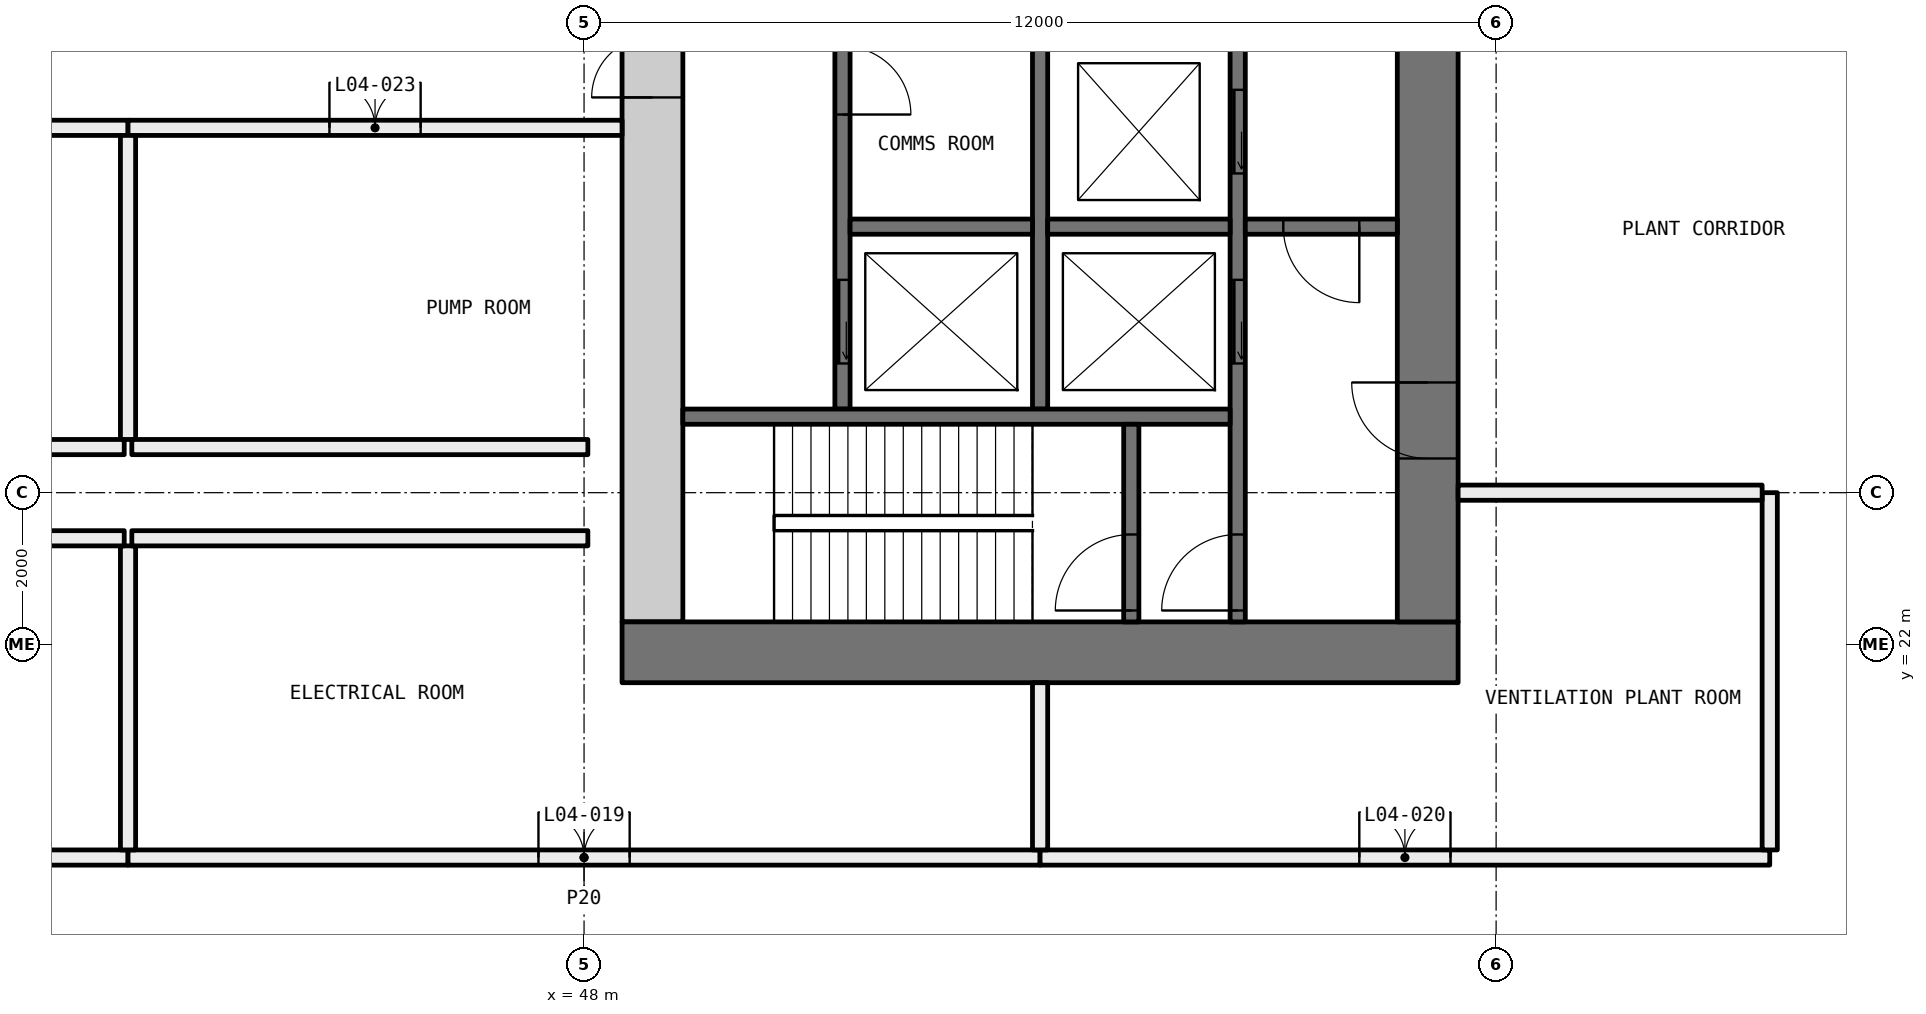
"""IFC4 building model, lengths in metres.
Left out: names, types, materials, properties, quantities, classifications, styles, units other than length and angle.
Written with IfcOpenShell. Run it as: python <this file> out.ifc"""

import sys

from ifc_helpers import new_model, si_unit, direction, frame, frame_2d, origin, place, context, subcontext, project, spatial, rectangle, extrude, element, fill, save


model = new_model("IFC4")
c1 = context("Model", 3, precision=1e-05, world=origin(), true_north=direction((0.0, 1.0)))
c2 = subcontext(c1, "Body", "Model", "MODEL_VIEW")
j1 = project(units=[si_unit("LENGTHUNIT", "METRE"), si_unit("PLANEANGLEUNIT", "RADIAN")], contexts=[c1])
p1 = place(None, origin())
s1 = spatial("IfcSite", under=j1, at=p1, CompositionType="ELEMENT")
p2 = place(p1, origin())
s2 = spatial("IfcBuilding", under=s1, at=p2, CompositionType="ELEMENT")
p3 = place(p2, frame((0.0, 0.0, 24.0)))
s3 = spatial("IfcBuildingStorey", under=s2, at=p3, CompositionType="ELEMENT", Elevation=24.0)
p4 = place(p3, frame((30.0, 19.2, 0.0), z_axis=(0.0, 0.0, 1.0), x_axis=(1.0, 0.0, 0.0)))
e1 = element("IfcWall", 1, at=p4, inside=s3, PredefinedType="PARTITIONING", context=c2, shape_type="SweptSolid", body=[
    extrude(rectangle(XDim=12.0, YDim=0.2, at=frame_2d((6.0, 0.0))), origin(), (0.0, 0.0, 1.0), 5.6),
])
p5 = place(p4, frame((5.4, 0.0, 0.0)))
e2 = element("IfcOpeningElement", 2, at=p5, cuts=e1, PredefinedType="OPENING", context=c2, shape_type="SweptSolid", body=[
    extrude(rectangle(XDim=1.2, YDim=2.1, at=frame_2d((0.6, 1.05))), frame((0.0, 0.11, 0.0), z_axis=(0.0, -1.0, 0.0), x_axis=(1.0, 0.0, 0.0)), (0.0, 0.0, 1.0), 0.22),
])
p6 = place(p3, frame((42.0, 19.2, 0.0), z_axis=(0.0, 0.0, 1.0), x_axis=(1.0, 0.0, 0.0)))
e3 = element("IfcWall", 3, at=p6, inside=s3, PredefinedType="PARTITIONING", context=c2, shape_type="SweptSolid", body=[
    extrude(rectangle(XDim=12.0, YDim=0.2, at=frame_2d((6.0, 0.0))), origin(), (0.0, 0.0, 1.0), 5.6),
])
p7 = place(p6, frame((5.4, 0.0, 0.0)))
e4 = element("IfcOpeningElement", 4, at=p7, cuts=e3, PredefinedType="OPENING", context=c2, shape_type="SweptSolid", body=[
    extrude(rectangle(XDim=1.2, YDim=2.1, at=frame_2d((0.6, 1.05))), frame((0.0, 0.11, 0.0), z_axis=(0.0, -1.0, 0.0), x_axis=(1.0, 0.0, 0.0)), (0.0, 0.0, 1.0), 0.22),
])
p8 = place(p3, frame((54.0, 19.2, 0.0), z_axis=(0.0, 0.0, 1.0), x_axis=(1.0, 0.0, 0.0)))
e5 = element("IfcWall", 5, at=p8, inside=s3, PredefinedType="PARTITIONING", context=c2, shape_type="SweptSolid", body=[
    extrude(rectangle(XDim=9.6, YDim=0.2, at=frame_2d((4.8, 0.0))), origin(), (0.0, 0.0, 1.0), 5.6),
])
p9 = place(p8, frame((4.2, 0.0, 0.0)))
e6 = element("IfcOpeningElement", 6, at=p9, cuts=e5, PredefinedType="OPENING", context=c2, shape_type="SweptSolid", body=[
    extrude(rectangle(XDim=1.2, YDim=2.1, at=frame_2d((0.6, 1.05))), frame((0.0, 0.11, 0.0), z_axis=(0.0, -1.0, 0.0), x_axis=(1.0, 0.0, 0.0)), (0.0, 0.0, 1.0), 0.22),
])
p10 = place(p3, frame((63.6, 19.3, 0.0), z_axis=(0.0, 0.0, 1.0), x_axis=(0.0, 1.0, 0.0)))
e7 = element("IfcWall", 7, at=p10, inside=s3, PredefinedType="PARTITIONING", context=c2, shape_type="SweptSolid", body=[
    extrude(rectangle(XDim=4.7, YDim=0.2, at=frame_2d((2.35, 0.0))), origin(), (0.0, 0.0, 1.0), 5.0),
])
p11 = place(p3, frame((63.5, 24.0, 0.0), z_axis=(0.0, 0.0, 1.0), x_axis=(-1.0, 0.0, 0.0)))
e8 = element("IfcWall", 8, at=p11, inside=s3, PredefinedType="PARTITIONING", context=c2, shape_type="SweptSolid", body=[
    extrude(rectangle(XDim=4.0, YDim=0.2, at=frame_2d((2.0, 0.0))), origin(), (0.0, 0.0, 1.0), 5.0),
])
p12 = place(p3, frame((30.0, 28.8, 0.0), z_axis=(0.0, 0.0, 1.0), x_axis=(1.0, 0.0, 0.0)))
e9 = element("IfcWall", 9, at=p12, inside=s3, PredefinedType="PARTITIONING", context=c2, shape_type="SweptSolid", body=[
    extrude(rectangle(XDim=12.0, YDim=0.2, at=frame_2d((6.0, 0.0))), origin(), (0.0, 0.0, 1.0), 5.6),
])
p13 = place(p12, frame((5.4, 0.0, 0.0)))
e10 = element("IfcOpeningElement", 10, at=p13, cuts=e9, PredefinedType="OPENING", context=c2, shape_type="SweptSolid", body=[
    extrude(rectangle(XDim=1.2, YDim=2.1, at=frame_2d((0.6, 1.05))), frame((0.0, 0.11, 0.0), z_axis=(0.0, -1.0, 0.0), x_axis=(1.0, 0.0, 0.0)), (0.0, 0.0, 1.0), 0.22),
])
p14 = place(p3, frame((42.0, 28.8, 0.0), z_axis=(0.0, 0.0, 1.0), x_axis=(1.0, 0.0, 0.0)))
e11 = element("IfcWall", 11, at=p14, inside=s3, PredefinedType="PARTITIONING", context=c2, shape_type="SweptSolid", body=[
    extrude(rectangle(XDim=6.5, YDim=0.2, at=frame_2d((3.25, 0.0))), origin(), (0.0, 0.0, 1.0), 5.6),
])
p15 = place(p14, frame((2.65, 0.0, 0.0)))
e12 = element("IfcOpeningElement", 12, at=p15, cuts=e11, PredefinedType="OPENING", context=c2, shape_type="SweptSolid", body=[
    extrude(rectangle(XDim=1.2, YDim=2.1, at=frame_2d((0.6, 1.05))), frame((0.0, 0.11, 0.0), z_axis=(0.0, -1.0, 0.0), x_axis=(1.0, 0.0, 0.0)), (0.0, 0.0, 1.0), 0.22),
])
p16 = place(p3, frame((42.0, 19.3, 0.0), z_axis=(0.0, 0.0, 1.0), x_axis=(0.0, 1.0, 0.0)))
e13 = element("IfcWall", 13, at=p16, inside=s3, PredefinedType="PARTITIONING", context=c2, shape_type="SweptSolid", body=[
    extrude(rectangle(XDim=4.0, YDim=0.2, at=frame_2d((2.0, 0.0))), origin(), (0.0, 0.0, 1.0), 5.6),
])
p17 = place(p3, frame((54.0, 19.3, 0.0), z_axis=(0.0, 0.0, 1.0), x_axis=(0.0, 1.0, 0.0)))
e14 = element("IfcWall", 14, at=p17, inside=s3, PredefinedType="PARTITIONING", context=c2, shape_type="SweptSolid", body=[
    extrude(rectangle(XDim=2.2, YDim=0.2, at=frame_2d((1.1, 0.0))), origin(), (0.0, 0.0, 1.0), 5.6),
])
p18 = place(p3, frame((42.0, 24.7, 0.0), z_axis=(0.0, 0.0, 1.0), x_axis=(0.0, 1.0, 0.0)))
e15 = element("IfcWall", 15, at=p18, inside=s3, PredefinedType="PARTITIONING", context=c2, shape_type="SweptSolid", body=[
    extrude(rectangle(XDim=4.0, YDim=0.2, at=frame_2d((2.0, 0.0))), origin(), (0.0, 0.0, 1.0), 5.6),
])
p19 = place(p3, frame((41.95, 23.4, 0.0), z_axis=(0.0, 0.0, 1.0), x_axis=(-1.0, 0.0, 0.0)))
e16 = element("IfcWall", 16, at=p19, inside=s3, PredefinedType="PARTITIONING", context=c2, shape_type="SweptSolid", body=[
    extrude(rectangle(XDim=11.9, YDim=0.2, at=frame_2d((5.95, 0.0))), origin(), (0.0, 0.0, 1.0), 5.6),
])
p20 = place(p3, frame((48.05, 23.4, 0.0), z_axis=(0.0, 0.0, 1.0), x_axis=(-1.0, 0.0, 0.0)))
e17 = element("IfcWall", 17, at=p20, inside=s3, PredefinedType="PARTITIONING", context=c2, shape_type="SweptSolid", body=[
    extrude(rectangle(XDim=6.0, YDim=0.2, at=frame_2d((3.0, 0.0))), origin(), (0.0, 0.0, 1.0), 5.6),
])
p21 = place(p3, frame((30.05, 24.6, 0.0), z_axis=(0.0, 0.0, 1.0), x_axis=(1.0, 0.0, 0.0)))
e18 = element("IfcWall", 18, at=p21, inside=s3, PredefinedType="PARTITIONING", context=c2, shape_type="SweptSolid", body=[
    extrude(rectangle(XDim=11.9, YDim=0.2, at=frame_2d((5.95, 0.0))), origin(), (0.0, 0.0, 1.0), 5.6),
])
p22 = place(p3, frame((42.05, 24.6, 0.0), z_axis=(0.0, 0.0, 1.0), x_axis=(1.0, 0.0, 0.0)))
e19 = element("IfcWall", 19, at=p22, inside=s3, PredefinedType="PARTITIONING", context=c2, shape_type="SweptSolid", body=[
    extrude(rectangle(XDim=6.0, YDim=0.2, at=frame_2d((3.0, 0.0))), origin(), (0.0, 0.0, 1.0), 5.6),
])
p23 = place(p3, frame((59.5, 21.9, 0.0), z_axis=(0.0, 0.0, 1.0), x_axis=(-1.0, 0.0, 0.0)))
e20 = element("IfcWall", 20, at=p23, inside=s3, PredefinedType="SHEAR", context=c2, shape_type="SweptSolid", body=[
    extrude(rectangle(XDim=11.0, YDim=0.8, at=frame_2d((5.5, 0.0))), origin(), (0.0, 0.0, 1.0), 5.6),
])
p24 = place(p3, frame((59.1, 22.3, 0.0), z_axis=(0.0, 0.0, 1.0), x_axis=(0.0, 1.0, 0.0)))
e21 = element("IfcWall", 21, at=p24, inside=s3, PredefinedType="SHEAR", context=c2, shape_type="SweptSolid", body=[
    extrude(rectangle(XDim=15.4, YDim=0.8, at=frame_2d((7.7, 0.0))), origin(), (0.0, 0.0, 1.0), 5.6),
])
p25 = place(p24, frame((8.15, 0.0, 0.0)))
e22 = element("IfcOpeningElement", 22, at=p25, cuts=e21, PredefinedType="OPENING", context=c2, shape_type="SweptSolid", body=[
    extrude(rectangle(XDim=1.6, YDim=2.1, at=frame_2d((0.8, 1.05))), frame((0.0, 0.41, 0.0), z_axis=(0.0, -1.0, 0.0), x_axis=(1.0, 0.0, 0.0)), (0.0, 0.0, 1.0), 0.82),
])
p26 = place(p24, frame((2.15, 0.0, 0.0)))
e23 = element("IfcOpeningElement", 23, at=p26, cuts=e21, PredefinedType="OPENING", context=c2, shape_type="SweptSolid", body=[
    extrude(rectangle(XDim=1.0, YDim=2.1, at=frame_2d((0.5, 1.05))), frame((0.0, 0.41, 0.0), z_axis=(0.0, -1.0, 0.0), x_axis=(1.0, 0.0, 0.0)), (0.0, 0.0, 1.0), 0.82),
])
p27 = place(p3, frame((48.9, 22.3, 0.0), z_axis=(0.0, 0.0, 1.0), x_axis=(0.0, 1.0, 0.0)))
e24 = element("IfcWall", 24, at=p27, inside=s3, PredefinedType="SHEAR", context=c2, shape_type="SweptSolid", body=[
    extrude(rectangle(XDim=15.4, YDim=0.8, at=frame_2d((7.7, 0.0))), origin(), (0.0, 0.0, 1.0), 5.6),
])
p28 = place(p27, frame((6.9, 0.0, 0.0)))
e25 = element("IfcOpeningElement", 25, at=p28, cuts=e24, PredefinedType="OPENING", context=c2, shape_type="SweptSolid", body=[
    extrude(rectangle(XDim=1.6, YDim=2.1, at=frame_2d((0.8, 1.05))), frame((0.0, 0.41, 0.0), z_axis=(0.0, -1.0, 0.0), x_axis=(1.0, 0.0, 0.0)), (0.0, 0.0, 1.0), 0.82),
])
p29 = place(p3, frame((56.6, 22.3, 0.0), z_axis=(0.0, 0.0, 1.0), x_axis=(0.0, 1.0, 0.0)))
e26 = element("IfcWall", 26, at=p29, inside=s3, PredefinedType="SOLIDWALL", context=c2, shape_type="SweptSolid", body=[
    extrude(rectangle(XDim=12.6, YDim=0.2, at=frame_2d((6.3, 0.0))), origin(), (0.0, 0.0, 1.0), 5.6),
])
p30 = place(p29, frame((3.4, 0.0, 0.0)))
e27 = element("IfcOpeningElement", 27, at=p30, cuts=e26, PredefinedType="OPENING", context=c2, shape_type="SweptSolid", body=[
    extrude(rectangle(XDim=1.1, YDim=2.1, at=frame_2d((0.55, 1.05))), frame((0.0, 0.11, 0.0), z_axis=(0.0, -1.0, 0.0), x_axis=(1.0, 0.0, 0.0)), (0.0, 0.0, 1.0), 0.22),
])
p31 = place(p29, frame((5.9, 0.0, 0.0)))
e28 = element("IfcOpeningElement", 28, at=p31, cuts=e26, PredefinedType="OPENING", context=c2, shape_type="SweptSolid", body=[
    extrude(rectangle(XDim=1.1, YDim=2.1, at=frame_2d((0.55, 1.05))), frame((0.0, 0.11, 0.0), z_axis=(0.0, -1.0, 0.0), x_axis=(1.0, 0.0, 0.0)), (0.0, 0.0, 1.0), 0.22),
])
p32 = place(p29, frame((8.4, 0.0, 0.0)))
e29 = element("IfcOpeningElement", 29, at=p32, cuts=e26, PredefinedType="OPENING", context=c2, shape_type="SweptSolid", body=[
    extrude(rectangle(XDim=1.1, YDim=2.1, at=frame_2d((0.55, 1.05))), frame((0.0, 0.11, 0.0), z_axis=(0.0, -1.0, 0.0), x_axis=(1.0, 0.0, 0.0)), (0.0, 0.0, 1.0), 0.22),
])
p33 = place(p29, frame((10.9, 0.0, 0.0)))
e30 = element("IfcOpeningElement", 30, at=p33, cuts=e26, PredefinedType="OPENING", context=c2, shape_type="SweptSolid", body=[
    extrude(rectangle(XDim=1.1, YDim=2.1, at=frame_2d((0.55, 1.05))), frame((0.0, 0.11, 0.0), z_axis=(0.0, -1.0, 0.0), x_axis=(1.0, 0.0, 0.0)), (0.0, 0.0, 1.0), 0.22),
])
p34 = place(p29, frame((0.15, 0.0, 0.0)))
e31 = element("IfcOpeningElement", 31, at=p34, cuts=e26, PredefinedType="OPENING", context=c2, shape_type="SweptSolid", body=[
    extrude(rectangle(XDim=1.0, YDim=2.1, at=frame_2d((0.5, 1.05))), frame((0.0, 0.11, 0.0), z_axis=(0.0, -1.0, 0.0), x_axis=(1.0, 0.0, 0.0)), (0.0, 0.0, 1.0), 0.22),
])
p35 = place(p3, frame((51.4, 25.1, 0.0), z_axis=(0.0, 0.0, 1.0), x_axis=(0.0, 1.0, 0.0)))
e32 = element("IfcWall", 32, at=p35, inside=s3, PredefinedType="SOLIDWALL", context=c2, shape_type="SweptSolid", body=[
    extrude(rectangle(XDim=12.6, YDim=0.2, at=frame_2d((6.3, 0.0))), origin(), (0.0, 0.0, 1.0), 5.6),
])
p36 = place(p35, frame((0.6, 0.0, 0.0)))
e33 = element("IfcOpeningElement", 33, at=p36, cuts=e32, PredefinedType="OPENING", context=c2, shape_type="SweptSolid", body=[
    extrude(rectangle(XDim=1.1, YDim=2.1, at=frame_2d((0.55, 1.05))), frame((0.0, 0.11, 0.0), z_axis=(0.0, -1.0, 0.0), x_axis=(1.0, 0.0, 0.0)), (0.0, 0.0, 1.0), 0.22),
])
p37 = place(p35, frame((10.8, 0.0, 0.0)))
e34 = element("IfcOpeningElement", 34, at=p37, cuts=e32, PredefinedType="OPENING", context=c2, shape_type="SweptSolid", body=[
    extrude(rectangle(XDim=1.0, YDim=2.1, at=frame_2d((0.5, 1.05))), frame((0.0, 0.11, 0.0), z_axis=(0.0, -1.0, 0.0), x_axis=(1.0, 0.0, 0.0)), (0.0, 0.0, 1.0), 0.22),
])
p38 = place(p35, frame((3.875, 0.0, 0.0)))
e35 = element("IfcOpeningElement", 35, at=p38, cuts=e32, PredefinedType="OPENING", context=c2, shape_type="SweptSolid", body=[
    extrude(rectangle(XDim=0.9, YDim=2.1, at=frame_2d((0.45, 1.05))), frame((0.0, 0.11, 0.0), z_axis=(0.0, -1.0, 0.0), x_axis=(1.0, 0.0, 0.0)), (0.0, 0.0, 1.0), 0.22),
])
p39 = place(p35, frame((7.525, 0.0, 0.0)))
e36 = element("IfcOpeningElement", 36, at=p39, cuts=e32, PredefinedType="OPENING", context=c2, shape_type="SweptSolid", body=[
    extrude(rectangle(XDim=0.9, YDim=2.1, at=frame_2d((0.45, 1.05))), frame((0.0, 0.11, 0.0), z_axis=(0.0, -1.0, 0.0), x_axis=(1.0, 0.0, 0.0)), (0.0, 0.0, 1.0), 0.22),
])
p40 = place(p3, frame((54.0, 25.1, 0.0), z_axis=(0.0, 0.0, 1.0), x_axis=(0.0, 1.0, 0.0)))
e37 = element("IfcWall", 37, at=p40, inside=s3, PredefinedType="SOLIDWALL", context=c2, shape_type="SweptSolid", body=[
    extrude(rectangle(XDim=9.8, YDim=0.2, at=frame_2d((4.9, 0.0))), origin(), (0.0, 0.0, 1.0), 5.6),
])
p41 = place(p3, frame((56.5, 25.0, 0.0), z_axis=(0.0, 0.0, 1.0), x_axis=(-1.0, 0.0, 0.0)))
e38 = element("IfcWall", 38, at=p41, inside=s3, PredefinedType="SOLIDWALL", context=c2, shape_type="SweptSolid", body=[
    extrude(rectangle(XDim=7.2, YDim=0.2, at=frame_2d((3.6, 0.0))), origin(), (0.0, 0.0, 1.0), 5.6),
])
p42 = place(p3, frame((58.7, 27.5, 0.0), z_axis=(0.0, 0.0, 1.0), x_axis=(-1.0, 0.0, 0.0)))
e39 = element("IfcWall", 39, at=p42, inside=s3, PredefinedType="SOLIDWALL", context=c2, shape_type="SweptSolid", body=[
    extrude(rectangle(XDim=2.0, YDim=0.2, at=frame_2d((1.0, 0.0))), origin(), (0.0, 0.0, 1.0), 5.6),
])
p43 = place(p42, frame((0.5, 0.0, 0.0)))
e40 = element("IfcOpeningElement", 40, at=p43, cuts=e39, PredefinedType="OPENING", context=c2, shape_type="SweptSolid", body=[
    extrude(rectangle(XDim=1.0, YDim=2.1, at=frame_2d((0.5, 1.05))), frame((0.0, 0.11, 0.0), z_axis=(0.0, -1.0, 0.0), x_axis=(1.0, 0.0, 0.0)), (0.0, 0.0, 1.0), 0.22),
])
p44 = place(p3, frame((55.2, 22.3, 0.0), z_axis=(0.0, 0.0, 1.0), x_axis=(0.0, 1.0, 0.0)))
e41 = element("IfcWall", 41, at=p44, inside=s3, PredefinedType="SOLIDWALL", context=c2, shape_type="SweptSolid", body=[
    extrude(rectangle(XDim=2.6, YDim=0.2, at=frame_2d((1.3, 0.0))), origin(), (0.0, 0.0, 1.0), 5.6),
])
p45 = place(p44, frame((0.15, 0.0, 0.0)))
e42 = element("IfcOpeningElement", 42, at=p45, cuts=e41, PredefinedType="OPENING", context=c2, shape_type="SweptSolid", body=[
    extrude(rectangle(XDim=1.0, YDim=2.1, at=frame_2d((0.5, 1.05))), frame((0.0, 0.11, 0.0), z_axis=(0.0, -1.0, 0.0), x_axis=(1.0, 0.0, 0.0)), (0.0, 0.0, 1.0), 0.22),
])
for number, where, z_axis, x_axis in (
    (43, (56.5, 27.5, 0.0), (0.0, 0.0, 1.0), (-1.0, 0.0, 0.0)),
    (44, (53.9, 27.5, 0.0), (0.0, 0.0, 1.0), (-1.0, 0.0, 0.0)),
):
    element("IfcWall", number, at=place(p3, frame(where, z_axis=z_axis, x_axis=x_axis)), inside=s3, PredefinedType="SOLIDWALL", context=c2, shape_type="SweptSolid", body=[
        extrude(rectangle(XDim=2.4, YDim=0.2, at=frame_2d((1.2, 0.0))), origin(), (0.0, 0.0, 1.0), 5.6),
    ])
p46 = place(p7, origin())
e45 = element("IfcDoor", 45, at=p46, inside=s3, OperationType="DOUBLE_DOOR_SINGLE_SWING", PredefinedType="DOOR", context=c2, shape_type="SweptSolid", body=[
    extrude(rectangle(XDim=1.2, YDim=2.1, at=frame_2d((0.6, 1.05))), frame((0.0, 0.025, 0.0), z_axis=(0.0, -1.0, 0.0), x_axis=(1.0, 0.0, 0.0)), (0.0, 0.0, 1.0), 0.05),
])
fill(e4, e45)
p47 = place(p9, origin())
e46 = element("IfcDoor", 46, at=p47, inside=s3, OperationType="DOUBLE_DOOR_SINGLE_SWING", PredefinedType="DOOR", context=c2, shape_type="SweptSolid", body=[
    extrude(rectangle(XDim=1.2, YDim=2.1, at=frame_2d((0.6, 1.05))), frame((0.0, 0.025, 0.0), z_axis=(0.0, -1.0, 0.0), x_axis=(1.0, 0.0, 0.0)), (0.0, 0.0, 1.0), 0.05),
])
fill(e6, e46)
p48 = place(p15, origin())
e47 = element("IfcDoor", 47, at=p48, inside=s3, OperationType="DOUBLE_DOOR_SINGLE_SWING", PredefinedType="DOOR", context=c2, shape_type="SweptSolid", body=[
    extrude(rectangle(XDim=1.2, YDim=2.1, at=frame_2d((0.6, 1.05))), frame((0.0, 0.025, 0.0), z_axis=(0.0, -1.0, 0.0), x_axis=(1.0, 0.0, 0.0)), (0.0, 0.0, 1.0), 0.05),
])
fill(e12, e47)
p49 = place(p36, origin())
e48 = element("IfcDoor", 48, at=p49, inside=s3, OperationType="SLIDING_TO_LEFT", PredefinedType="DOOR", context=c2, shape_type="SweptSolid", body=[
    extrude(rectangle(XDim=1.1, YDim=2.1, at=frame_2d((0.55, 1.05))), frame((0.0, 0.025, 0.0), z_axis=(0.0, -1.0, 0.0), x_axis=(1.0, 0.0, 0.0)), (0.0, 0.0, 1.0), 0.05),
])
fill(e33, e48)
p50 = place(p30, origin())
e49 = element("IfcDoor", 49, at=p50, inside=s3, OperationType="SLIDING_TO_LEFT", PredefinedType="DOOR", context=c2, shape_type="SweptSolid", body=[
    extrude(rectangle(XDim=1.1, YDim=2.1, at=frame_2d((0.55, 1.05))), frame((0.0, 0.025, 0.0), z_axis=(0.0, -1.0, 0.0), x_axis=(1.0, 0.0, 0.0)), (0.0, 0.0, 1.0), 0.05),
])
fill(e27, e49)
p51 = place(p31, origin())
e50 = element("IfcDoor", 50, at=p51, inside=s3, OperationType="SLIDING_TO_LEFT", PredefinedType="DOOR", context=c2, shape_type="SweptSolid", body=[
    extrude(rectangle(XDim=1.1, YDim=2.1, at=frame_2d((0.55, 1.05))), frame((0.0, 0.025, 0.0), z_axis=(0.0, -1.0, 0.0), x_axis=(1.0, 0.0, 0.0)), (0.0, 0.0, 1.0), 0.05),
])
fill(e28, e50)
p52 = place(p45, origin())
e51 = element("IfcDoor", 51, at=p52, inside=s3, OperationType="SINGLE_SWING_RIGHT", PredefinedType="DOOR", context=c2, shape_type="SweptSolid", body=[
    extrude(rectangle(XDim=1.0, YDim=2.1, at=frame_2d((0.5, 1.05))), frame((0.0, 0.025, 0.0), z_axis=(0.0, -1.0, 0.0), x_axis=(1.0, 0.0, 0.0)), (0.0, 0.0, 1.0), 0.05),
])
fill(e42, e51)
p53 = place(p34, origin())
e52 = element("IfcDoor", 52, at=p53, inside=s3, OperationType="SINGLE_SWING_RIGHT", PredefinedType="DOOR", context=c2, shape_type="SweptSolid", body=[
    extrude(rectangle(XDim=1.0, YDim=2.1, at=frame_2d((0.5, 1.05))), frame((0.0, 0.025, 0.0), z_axis=(0.0, -1.0, 0.0), x_axis=(1.0, 0.0, 0.0)), (0.0, 0.0, 1.0), 0.05),
])
fill(e31, e52)
p54 = place(p43, origin())
e53 = element("IfcDoor", 53, at=p54, inside=s3, OperationType="SINGLE_SWING_RIGHT", PredefinedType="DOOR", context=c2, shape_type="SweptSolid", body=[
    extrude(rectangle(XDim=1.0, YDim=2.1, at=frame_2d((0.5, 1.05))), frame((0.0, 0.025, 0.0), z_axis=(0.0, -1.0, 0.0), x_axis=(1.0, 0.0, 0.0)), (0.0, 0.0, 1.0), 0.05),
])
fill(e40, e53)
p55 = place(p26, origin())
e54 = element("IfcDoor", 54, at=p55, inside=s3, OperationType="SINGLE_SWING_LEFT", PredefinedType="DOOR", context=c2, shape_type="SweptSolid", body=[
    extrude(rectangle(XDim=1.0, YDim=2.1, at=frame_2d((0.5, 1.05))), frame((0.0, 0.025, 0.0), z_axis=(0.0, -1.0, 0.0), x_axis=(1.0, 0.0, 0.0)), (0.0, 0.0, 1.0), 0.05),
])
fill(e23, e54)
p56 = place(p28, origin())
e55 = element("IfcDoor", 55, at=p56, inside=s3, OperationType="DOUBLE_DOOR_SINGLE_SWING", PredefinedType="DOOR", context=c2, shape_type="SweptSolid", body=[
    extrude(rectangle(XDim=1.6, YDim=2.1, at=frame_2d((0.8, 1.05))), frame((0.0, 0.025, 0.0), z_axis=(0.0, -1.0, 0.0), x_axis=(1.0, 0.0, 0.0)), (0.0, 0.0, 1.0), 0.05),
])
fill(e25, e55)
p57 = place(p38, frame((0.9, 0.0, 0.0), x_axis=(-1.0, 0.0, 0.0)))
e56 = element("IfcDoor", 56, at=p57, inside=s3, OperationType="SINGLE_SWING_LEFT", PredefinedType="DOOR", context=c2, shape_type="SweptSolid", body=[
    extrude(rectangle(XDim=0.9, YDim=2.1, at=frame_2d((0.45, 1.05))), frame((0.0, 0.025, 0.0), z_axis=(0.0, -1.0, 0.0), x_axis=(1.0, 0.0, 0.0)), (0.0, 0.0, 1.0), 0.05),
])
fill(e35, e56)
save(model, sys.argv[1])
